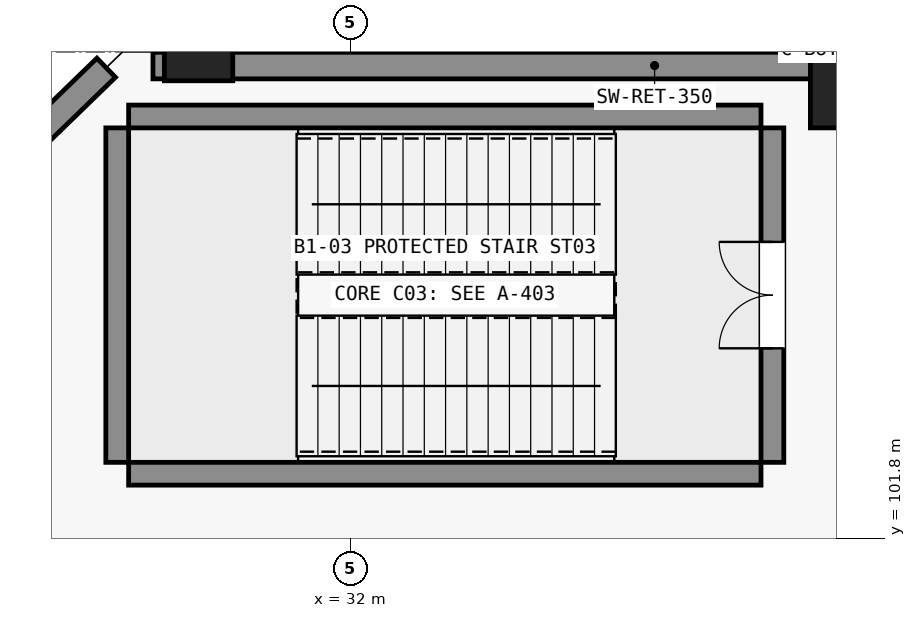
"""IFC4 building model, lengths in metres.
Left out: names, types, materials, properties, quantities, classifications, styles, units other than length and angle.
Written with IfcOpenShell. Run it as: python <this file> out.ifc"""

import sys

from ifc_helpers import new_model, si_unit, direction, frame, frame_2d, origin, origin_2d, place, context, subcontext, project, spatial, rectangle, extrude, element, fill, save


model = new_model("IFC4")
c1 = context("Model", 3, precision=1e-05, world=origin(), true_north=direction((0.0, 1.0)))
c2 = subcontext(c1, "Body", "Model", "MODEL_VIEW")
j1 = project(units=[si_unit("LENGTHUNIT", "METRE"), si_unit("PLANEANGLEUNIT", "RADIAN")], contexts=[c1])
p1 = place(None, origin())
s1 = spatial("IfcSite", under=j1, at=p1, CompositionType="ELEMENT")
p2 = place(p1, origin())
s2 = spatial("IfcBuilding", under=s1, at=p2, CompositionType="ELEMENT")
p3 = place(p2, frame((0.0, 0.0, -5.4)))
s3 = spatial("IfcBuildingStorey", under=s2, at=p3, CompositionType="ELEMENT", Elevation=-5.4)
for number, where, z_axis, x_axis in (
    (1, (38.5, 107.8, 0.0), (0.0, 0.0, 1.0), (1.0, 0.0, 0.0)),
    (2, (30.0, 108.42, 0.0), (0.0, 0.0, 1.0), (1.0, 0.0, 0.0)),
):
    element("IfcColumn", number, at=place(p3, frame(where, z_axis=z_axis, x_axis=x_axis)), inside=s3, PredefinedType="PILASTER", context=c2, shape_type="SweptSolid", body=[
        extrude(rectangle(XDim=0.9, YDim=1.2, at=origin_2d()), origin(), (0.0, 0.0, 1.0), 5.4),
    ])
for number, where, z_axis, x_axis in (
    (3, (29.08, 102.65, 0.0), (0.0, 0.0, 1.0), (1.0, 0.0, 0.0)),
    (4, (29.08, 107.35, 0.0), (0.0, 0.0, 1.0), (1.0, 0.0, 0.0)),
):
    element("IfcWall", number, at=place(p3, frame(where, z_axis=z_axis, x_axis=x_axis)), inside=s3, PredefinedType="SHEAR", context=c2, shape_type="SweptSolid", body=[
        extrude(rectangle(XDim=8.32, YDim=0.3, at=frame_2d((4.16, 0.0))), origin(), (0.0, 0.0, 1.0), 5.4),
    ])
p4 = place(p3, frame((28.93, 102.8, 0.0), z_axis=(0.0, 0.0, 1.0), x_axis=(0.0, 1.0, 0.0)))
e5 = element("IfcWall", 5, at=p4, inside=s3, PredefinedType="SHEAR", context=c2, shape_type="SweptSolid", body=[
    extrude(rectangle(XDim=4.4, YDim=0.3, at=frame_2d((2.2, 0.0))), origin(), (0.0, 0.0, 1.0), 5.4),
])
p5 = place(p3, frame((37.55, 102.8, 0.0), z_axis=(0.0, 0.0, 1.0), x_axis=(0.0, 1.0, 0.0)))
e6 = element("IfcWall", 6, at=p5, inside=s3, PredefinedType="SHEAR", context=c2, shape_type="SweptSolid", body=[
    extrude(rectangle(XDim=4.4, YDim=0.3, at=frame_2d((2.2, 0.0))), origin(), (0.0, 0.0, 1.0), 5.4),
])
p6 = place(p5, frame((1.5, 0.0, 0.0)))
e7 = element("IfcOpeningElement", 7, at=p6, cuts=e6, PredefinedType="OPENING", context=c2, shape_type="SweptSolid", body=[
    extrude(rectangle(XDim=1.4, YDim=2.2, at=frame_2d((0.7, 1.1))), frame((0.0, 0.16, 0.0), z_axis=(0.0, -1.0, 0.0), x_axis=(1.0, 0.0, 0.0)), (0.0, 0.0, 1.0), 0.32),
])
p7 = place(p3, frame((29.4, 108.02, 0.0), z_axis=(0.0, 0.0, 1.0), x_axis=(1.0, 0.0, 0.0)))
e8 = element("IfcWall", 8, at=p7, inside=s3, PredefinedType="SOLIDWALL", context=c2, shape_type="SweptSolid", body=[
    extrude(rectangle(XDim=13.2, YDim=0.35, at=frame_2d((6.6, 0.0))), origin(), (0.0, 0.0, 1.0), 4.96),
])
p8 = place(p3, frame((28.785, 107.991, 0.0), z_axis=(0.0, 0.0, 1.0), x_axis=(-0.718073787682, -0.695966978703, 0.0)))
e9 = element("IfcWall", 9, at=p8, inside=s3, PredefinedType="SOLIDWALL", context=c2, shape_type="SweptSolid", body=[
    extrude(rectangle(XDim=17.504, YDim=0.35, at=frame_2d((8.752, 0.0))), origin(), (0.0, 0.0, 1.0), 4.96),
])
p9 = place(p6, origin())
e10 = element("IfcDoor", 10, at=p9, inside=s3, OperationType="DOUBLE_DOOR_SINGLE_SWING", PredefinedType="DOOR", context=c2, shape_type="SweptSolid", body=[
    extrude(rectangle(XDim=1.4, YDim=2.2, at=frame_2d((0.7, 1.1))), frame((0.0, 0.025, 0.0), z_axis=(0.0, -1.0, 0.0), x_axis=(1.0, 0.0, 0.0)), (0.0, 0.0, 1.0), 0.05),
])
fill(e7, e10)
save(model, sys.argv[1])
